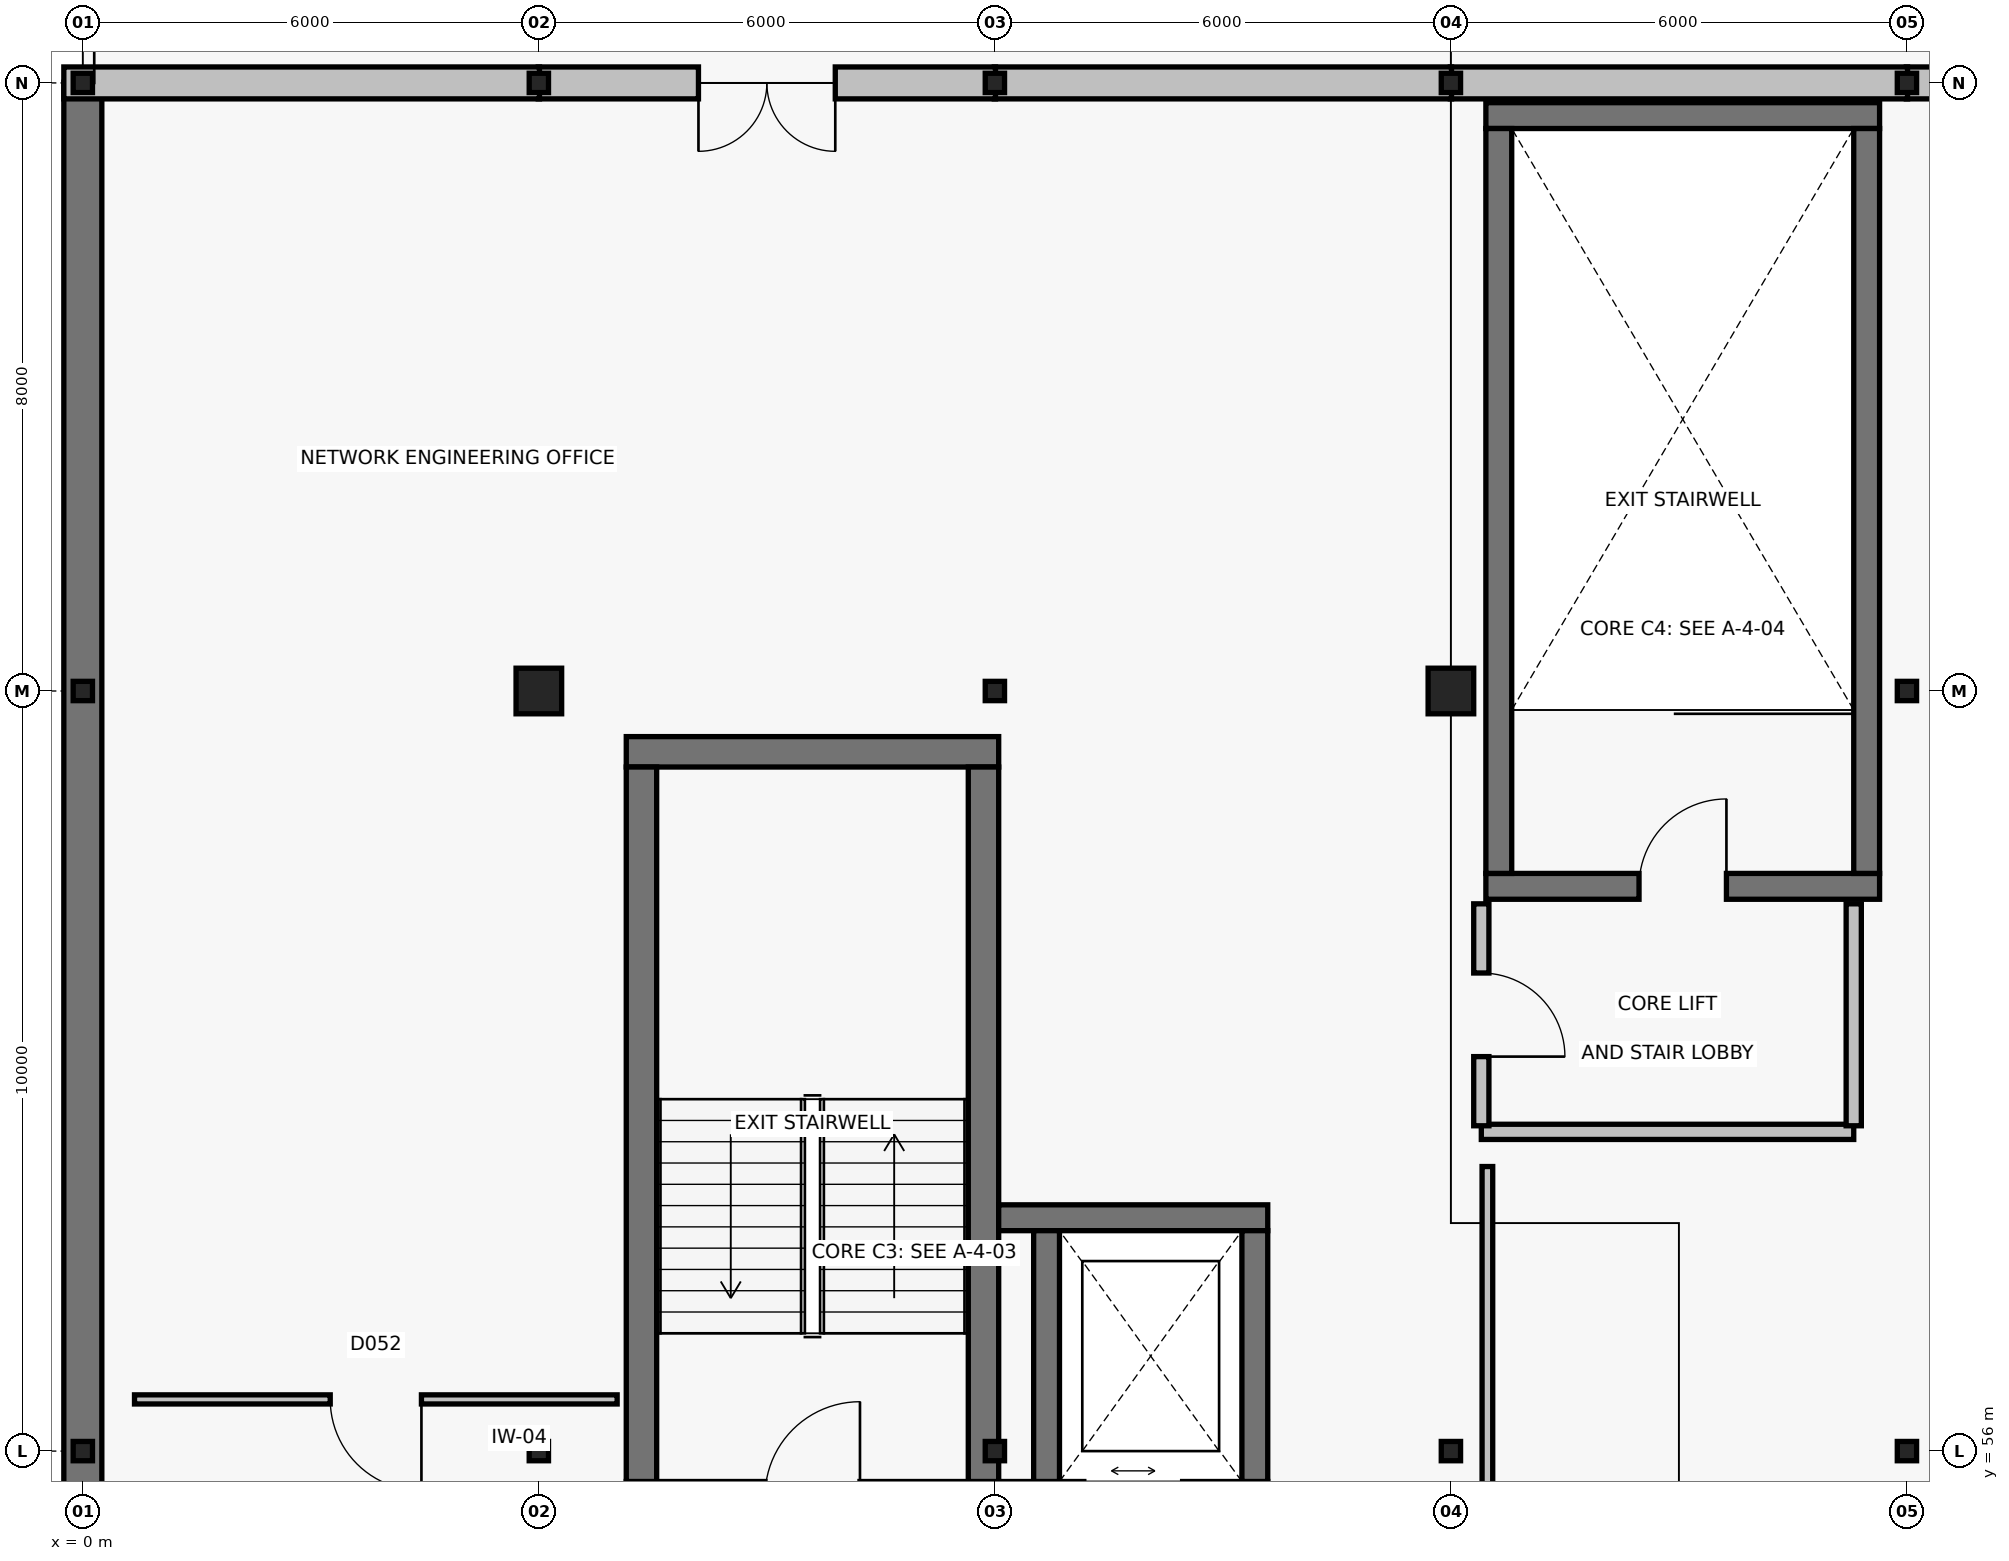
"""IFC4 building model, lengths in metres.
Left out: names, types, materials, properties, quantities, classifications, styles, units other than length and angle.
Written with IfcOpenShell. Run it as: python <this file> out.ifc"""

import sys

from ifc_helpers import new_model, si_unit, direction, frame, frame_2d, origin, origin_2d, place, context, subcontext, project, spatial, rectangle, hollow_rectangle, extrude, element, fill, save


model = new_model("IFC4")
c1 = context("Model", 3, precision=1e-05, world=origin(), true_north=direction((0.0, 1.0)))
c2 = subcontext(c1, "Body", "Model", "MODEL_VIEW")
j1 = project(units=[si_unit("LENGTHUNIT", "METRE"), si_unit("PLANEANGLEUNIT", "RADIAN")], contexts=[c1])
p1 = place(None, origin())
s1 = spatial("IfcSite", under=j1, at=p1, CompositionType="ELEMENT")
p2 = place(p1, origin())
s2 = spatial("IfcBuilding", under=s1, at=p2, CompositionType="ELEMENT")
p3 = place(p2, frame((0.0, 0.0, 15.4)))
s3 = spatial("IfcBuildingStorey", under=s2, at=p3, CompositionType="ELEMENT", Elevation=15.4)
for number, where, z_axis, x_axis in (
    (1, (0.0, 56.0, 0.0), (0.0, 0.0, 1.0), (1.0, 0.0, 0.0)),
    (2, (0.0, 66.0, 0.0), (0.0, 0.0, 1.0), (1.0, 0.0, 0.0)),
    (3, (0.0, 74.0, 0.0), (0.0, 0.0, 1.0), (1.0, 0.0, 0.0)),
    (4, (6.0, 56.0, 0.0), (0.0, 0.0, 1.0), (1.0, 0.0, 0.0)),
):
    element("IfcColumn", number, at=place(p3, frame(where, z_axis=z_axis, x_axis=x_axis)), inside=s3, PredefinedType="COLUMN", context=c2, shape_type="SweptSolid", body=[
        extrude(hollow_rectangle(XDim=0.254, YDim=0.254, WallThickness=0.01, InnerFilletRadius=0.01, OuterFilletRadius=0.019, at=origin_2d()), origin(), (0.0, 0.0, 1.0), 4.0),
    ])
p4 = place(p3, frame((6.0, 66.0, 0.0), z_axis=(0.0, 0.0, 1.0), x_axis=(1.0, 0.0, 0.0)))
e5 = element("IfcColumn", 5, at=p4, inside=s3, PredefinedType="COLUMN", context=c2, shape_type="SweptSolid", body=[
    extrude(rectangle(XDim=0.6, YDim=0.6, at=origin_2d()), origin(), (0.0, 0.0, 1.0), 4.0),
])
for number, where, z_axis, x_axis in (
    (6, (6.0, 74.0, 0.0), (0.0, 0.0, 1.0), (1.0, 0.0, 0.0)),
    (7, (12.0, 56.0, 0.0), (0.0, 0.0, 1.0), (1.0, 0.0, 0.0)),
    (8, (12.0, 66.0, 0.0), (0.0, 0.0, 1.0), (1.0, 0.0, 0.0)),
    (9, (12.0, 74.0, 0.0), (0.0, 0.0, 1.0), (1.0, 0.0, 0.0)),
    (10, (18.0, 56.0, 0.0), (0.0, 0.0, 1.0), (1.0, 0.0, 0.0)),
):
    element("IfcColumn", number, at=place(p3, frame(where, z_axis=z_axis, x_axis=x_axis)), inside=s3, PredefinedType="COLUMN", context=c2, shape_type="SweptSolid", body=[
        extrude(hollow_rectangle(XDim=0.254, YDim=0.254, WallThickness=0.01, InnerFilletRadius=0.01, OuterFilletRadius=0.019, at=origin_2d()), origin(), (0.0, 0.0, 1.0), 4.0),
    ])
p5 = place(p3, frame((18.0, 66.0, 0.0), z_axis=(0.0, 0.0, 1.0), x_axis=(1.0, 0.0, 0.0)))
e11 = element("IfcColumn", 11, at=p5, inside=s3, PredefinedType="COLUMN", context=c2, shape_type="SweptSolid", body=[
    extrude(rectangle(XDim=0.6, YDim=0.6, at=origin_2d()), origin(), (0.0, 0.0, 1.0), 4.0),
])
for number, where, z_axis, x_axis in (
    (12, (18.0, 74.0, 0.0), (0.0, 0.0, 1.0), (1.0, 0.0, 0.0)),
    (13, (24.0, 56.0, 0.0), (0.0, 0.0, 1.0), (1.0, 0.0, 0.0)),
    (14, (24.0, 66.0, 0.0), (0.0, 0.0, 1.0), (1.0, 0.0, 0.0)),
    (15, (24.0, 74.0, 0.0), (0.0, 0.0, 1.0), (1.0, 0.0, 0.0)),
):
    element("IfcColumn", number, at=place(p3, frame(where, z_axis=z_axis, x_axis=x_axis)), inside=s3, PredefinedType="COLUMN", context=c2, shape_type="SweptSolid", body=[
        extrude(hollow_rectangle(XDim=0.254, YDim=0.254, WallThickness=0.01, InnerFilletRadius=0.01, OuterFilletRadius=0.019, at=origin_2d()), origin(), (0.0, 0.0, 1.0), 4.0),
    ])
p6 = place(p3, frame((0.0, -0.008, 0.0), z_axis=(0.0, 0.0, 1.0), x_axis=(0.0, 1.0, 0.0)))
e16 = element("IfcWall", 16, at=p6, inside=s3, PredefinedType="SOLIDWALL", context=c2, shape_type="SweptSolid", body=[
    extrude(rectangle(XDim=74.016, YDim=0.5, at=frame_2d((37.008, 0.0))), origin(), (0.0, 0.0, 1.0), 3.68),
])
p7 = place(p3, frame((30.008, 74.0, 0.0), z_axis=(0.0, 0.0, 1.0), x_axis=(-1.0, 0.0, 0.0)))
e17 = element("IfcWall", 17, at=p7, inside=s3, PredefinedType="SOLIDWALL", context=c2, shape_type="SweptSolid", body=[
    extrude(rectangle(XDim=6.016, YDim=0.42, at=frame_2d((3.008, 0.0))), origin(), (0.0, 0.0, 1.0), 2.957),
])
p8 = place(p7, frame((2.033, 0.0, 0.0)))
e18 = element("IfcOpeningElement", 18, at=p8, cuts=e17, PredefinedType="OPENING", context=c2, shape_type="SweptSolid", body=[
    extrude(rectangle(XDim=1.95, YDim=2.3, at=frame_2d((0.975, 1.15))), frame((0.0, 0.225, 0.0), z_axis=(0.0, -1.0, 0.0), x_axis=(1.0, 0.0, 0.0)), (0.0, 0.0, 1.0), 0.45),
])
for number, where, z_axis, x_axis in (
    (19, (24.008, 74.0, 0.0), (0.0, 0.0, 1.0), (-1.0, 0.0, 0.0)),
    (20, (18.008, 74.0, 0.0), (0.0, 0.0, 1.0), (-1.0, 0.0, 0.0)),
):
    element("IfcWall", number, at=place(p3, frame(where, z_axis=z_axis, x_axis=x_axis)), inside=s3, PredefinedType="SOLIDWALL", context=c2, shape_type="SweptSolid", body=[
        extrude(rectangle(XDim=6.016, YDim=0.42, at=frame_2d((3.008, 0.0))), origin(), (0.0, 0.0, 1.0), 2.957),
    ])
p9 = place(p3, frame((12.008, 74.0, 0.0), z_axis=(0.0, 0.0, 1.0), x_axis=(-1.0, 0.0, 0.0)))
e21 = element("IfcWall", 21, at=p9, inside=s3, PredefinedType="SOLIDWALL", context=c2, shape_type="SweptSolid", body=[
    extrude(rectangle(XDim=6.016, YDim=0.42, at=frame_2d((3.008, 0.0))), origin(), (0.0, 0.0, 1.0), 2.957),
])
p10 = place(p9, frame((2.108, 0.0, 0.0)))
e22 = element("IfcOpeningElement", 22, at=p10, cuts=e21, PredefinedType="OPENING", context=c2, shape_type="SweptSolid", body=[
    extrude(rectangle(XDim=1.8, YDim=2.25, at=frame_2d((0.9, 1.125))), frame((0.0, 0.225, 0.0), z_axis=(0.0, -1.0, 0.0), x_axis=(1.0, 0.0, 0.0)), (0.0, 0.0, 1.0), 0.45),
])
p11 = place(p3, frame((6.008, 74.0, 0.0), z_axis=(0.0, 0.0, 1.0), x_axis=(-1.0, 0.0, 0.0)))
e23 = element("IfcWall", 23, at=p11, inside=s3, PredefinedType="SOLIDWALL", context=c2, shape_type="SweptSolid", body=[
    extrude(rectangle(XDim=6.258, YDim=0.42, at=frame_2d((3.129, 0.0))), origin(), (0.0, 0.0, 1.0), 2.957),
])
p12 = place(p3, frame((12.05, 65.2, 0.0), z_axis=(0.0, 0.0, 1.0), x_axis=(-1.0, 0.0, 0.0)))
e24 = element("IfcWall", 24, at=p12, inside=s3, PredefinedType="SHEAR", context=c2, shape_type="SweptSolid", body=[
    extrude(rectangle(XDim=4.9, YDim=0.4, at=frame_2d((2.45, 0.0))), origin(), (0.0, 0.0, 1.0), 3.7),
])
for number, where, z_axis, x_axis in (
    (25, (7.35, 65.0, 0.0), (0.0, 0.0, 1.0), (0.0, -1.0, 0.0)),
    (26, (11.85, 55.6, 0.0), (0.0, 0.0, 1.0), (0.0, 1.0, 0.0)),
):
    element("IfcWall", number, at=place(p3, frame(where, z_axis=z_axis, x_axis=x_axis)), inside=s3, PredefinedType="SHEAR", context=c2, shape_type="SweptSolid", body=[
        extrude(rectangle(XDim=9.4, YDim=0.4, at=frame_2d((4.7, 0.0))), origin(), (0.0, 0.0, 1.0), 3.7),
    ])
p13 = place(p3, frame((15.59, 59.07, 0.0), z_axis=(0.0, 0.0, 1.0), x_axis=(-1.0, 0.0, 0.0)))
e27 = element("IfcWall", 27, at=p13, inside=s3, PredefinedType="SHEAR", context=c2, shape_type="SweptSolid", body=[
    extrude(rectangle(XDim=3.54, YDim=0.34, at=frame_2d((1.77, 0.0))), origin(), (0.0, 0.0, 1.0), 3.7),
])
for number, where, z_axis, x_axis in (
    (28, (12.68, 58.9, 0.0), (0.0, 0.0, 1.0), (0.0, -1.0, 0.0)),
    (29, (15.42, 55.6, 0.0), (0.0, 0.0, 1.0), (0.0, 1.0, 0.0)),
):
    element("IfcWall", number, at=place(p3, frame(where, z_axis=z_axis, x_axis=x_axis)), inside=s3, PredefinedType="SHEAR", context=c2, shape_type="SweptSolid", body=[
        extrude(rectangle(XDim=3.3, YDim=0.34, at=frame_2d((1.65, 0.0))), origin(), (0.0, 0.0, 1.0), 3.7),
    ])
p14 = place(p3, frame((18.46, 63.43, 0.0), z_axis=(0.0, 0.0, 1.0), x_axis=(1.0, 0.0, 0.0)))
e30 = element("IfcWall", 30, at=p14, inside=s3, PredefinedType="SHEAR", context=c2, shape_type="SweptSolid", body=[
    extrude(rectangle(XDim=5.18, YDim=0.34, at=frame_2d((2.59, 0.0))), origin(), (0.0, 0.0, 1.0), 3.7),
])
p15 = place(p14, frame((2.015, 0.0, 0.0)))
e31 = element("IfcOpeningElement", 31, at=p15, cuts=e30, PredefinedType="OPENING", context=c2, shape_type="SweptSolid", body=[
    extrude(rectangle(XDim=1.15, YDim=2.15, at=frame_2d((0.575, 1.075))), frame((0.0, 0.185, 0.0), z_axis=(0.0, -1.0, 0.0), x_axis=(1.0, 0.0, 0.0)), (0.0, 0.0, 1.0), 0.37),
])
p16 = place(p3, frame((23.64, 73.57, 0.0), z_axis=(0.0, 0.0, 1.0), x_axis=(-1.0, 0.0, 0.0)))
e32 = element("IfcWall", 32, at=p16, inside=s3, PredefinedType="SHEAR", context=c2, shape_type="SweptSolid", body=[
    extrude(rectangle(XDim=5.18, YDim=0.34, at=frame_2d((2.59, 0.0))), origin(), (0.0, 0.0, 1.0), 3.7),
])
for number, where, z_axis, x_axis in (
    (33, (18.63, 73.4, 0.0), (0.0, 0.0, 1.0), (0.0, -1.0, 0.0)),
    (34, (23.47, 63.6, 0.0), (0.0, 0.0, 1.0), (0.0, 1.0, 0.0)),
):
    element("IfcWall", number, at=place(p3, frame(where, z_axis=z_axis, x_axis=x_axis)), inside=s3, PredefinedType="SHEAR", context=c2, shape_type="SweptSolid", body=[
        extrude(rectangle(XDim=9.8, YDim=0.34, at=frame_2d((4.9, 0.0))), origin(), (0.0, 0.0, 1.0), 3.7),
    ])
p17 = place(p3, frame((18.4, 60.2, 0.0), z_axis=(0.0, 0.0, 1.0), x_axis=(1.0, 0.0, 0.0)))
e35 = element("IfcWall", 35, at=p17, inside=s3, PredefinedType="PARTITIONING", context=c2, shape_type="SweptSolid", body=[
    extrude(rectangle(XDim=4.9, YDim=0.2, at=frame_2d((2.45, 0.0))), origin(), (0.0, 0.0, 1.0), 2.957),
])
p18 = place(p3, frame((18.4, 63.2, 0.0), z_axis=(0.0, 0.0, 1.0), x_axis=(0.0, -1.0, 0.0)))
e36 = element("IfcWall", 36, at=p18, inside=s3, PredefinedType="PARTITIONING", context=c2, shape_type="SweptSolid", body=[
    extrude(rectangle(XDim=2.92, YDim=0.2, at=frame_2d((1.46, 0.0))), origin(), (0.0, 0.0, 1.0), 2.957),
])
p19 = place(p18, frame((0.91, 0.0, 0.0)))
e37 = element("IfcOpeningElement", 37, at=p19, cuts=e36, PredefinedType="OPENING", context=c2, shape_type="SweptSolid", body=[
    extrude(rectangle(XDim=1.1, YDim=2.15, at=frame_2d((0.55, 1.075))), frame((0.0, 0.115, 0.0), z_axis=(0.0, -1.0, 0.0), x_axis=(1.0, 0.0, 0.0)), (0.0, 0.0, 1.0), 0.23),
])
p20 = place(p3, frame((23.3, 60.28, 0.0), z_axis=(0.0, 0.0, 1.0), x_axis=(0.0, 1.0, 0.0)))
e38 = element("IfcWall", 38, at=p20, inside=s3, PredefinedType="PARTITIONING", context=c2, shape_type="SweptSolid", body=[
    extrude(rectangle(XDim=2.92, YDim=0.2, at=frame_2d((1.46, 0.0))), origin(), (0.0, 0.0, 1.0), 3.68),
])
p21 = place(p3, frame((18.48, 34.68, 0.0), z_axis=(0.0, 0.0, 1.0), x_axis=(0.0, 1.0, 0.0)))
e39 = element("IfcWall", 39, at=p21, inside=s3, PredefinedType="PARTITIONING", context=c2, shape_type="SweptSolid", body=[
    extrude(rectangle(XDim=25.064, YDim=0.14, at=frame_2d((12.532, 0.0))), origin(), (0.0, 0.0, 1.0), 3.111),
])
p22 = place(p21, frame((15.551, 0.0, 0.0)))
e40 = element("IfcOpeningElement", 40, at=p22, cuts=e39, PredefinedType="OPENING", context=c2, shape_type="SweptSolid", body=[
    extrude(rectangle(XDim=1.14, YDim=2.15, at=frame_2d((0.57, 1.075))), frame((0.0, 0.085, 0.0), z_axis=(0.0, -1.0, 0.0), x_axis=(1.0, 0.0, 0.0)), (0.0, 0.0, 1.0), 0.17),
])
p23 = place(p3, frame((7.03, 56.68, 0.0), z_axis=(0.0, 0.0, 1.0), x_axis=(-1.0, 0.0, 0.0)))
e41 = element("IfcWall", 41, at=p23, inside=s3, PredefinedType="PARTITIONING", context=c2, shape_type="SweptSolid", body=[
    extrude(rectangle(XDim=6.35, YDim=0.12, at=frame_2d((3.175, 0.0))), origin(), (0.0, 0.0, 1.0), 2.957),
])
p24 = place(p23, frame((2.575, 0.0, 0.0)))
e42 = element("IfcOpeningElement", 42, at=p24, cuts=e41, PredefinedType="OPENING", context=c2, shape_type="SweptSolid", body=[
    extrude(rectangle(XDim=1.2, YDim=2.15, at=frame_2d((0.6, 1.075))), frame((0.0, 0.075, 0.0), z_axis=(0.0, -1.0, 0.0), x_axis=(1.0, 0.0, 0.0)), (0.0, 0.0, 1.0), 0.15),
])
p25 = place(p10, origin())
e43 = element("IfcDoor", 43, at=p25, inside=s3, OperationType="DOUBLE_DOOR_SINGLE_SWING", PredefinedType="DOOR", context=c2, shape_type="SweptSolid", body=[
    extrude(rectangle(XDim=1.8, YDim=2.25, at=frame_2d((0.9, 1.125))), frame((0.0, 0.025, 0.0), z_axis=(0.0, -1.0, 0.0), x_axis=(1.0, 0.0, 0.0)), (0.0, 0.0, 1.0), 0.05),
])
fill(e22, e43)
p26 = place(p15, origin())
e44 = element("IfcDoor", 44, at=p26, inside=s3, OperationType="SINGLE_SWING_RIGHT", PredefinedType="DOOR", context=c2, shape_type="SweptSolid", body=[
    extrude(rectangle(XDim=1.15, YDim=2.15, at=frame_2d((0.575, 1.075))), frame((0.0, 0.025, 0.0), z_axis=(0.0, -1.0, 0.0), x_axis=(1.0, 0.0, 0.0)), (0.0, 0.0, 1.0), 0.05),
])
fill(e31, e44)
p27 = place(p19, origin())
e45 = element("IfcDoor", 45, at=p27, inside=s3, OperationType="SINGLE_SWING_RIGHT", PredefinedType="DOOR", context=c2, shape_type="SweptSolid", body=[
    extrude(rectangle(XDim=1.1, YDim=2.15, at=frame_2d((0.55, 1.075))), frame((0.0, 0.025, 0.0), z_axis=(0.0, -1.0, 0.0), x_axis=(1.0, 0.0, 0.0)), (0.0, 0.0, 1.0), 0.05),
])
fill(e37, e45)
p28 = place(p24, origin())
e46 = element("IfcDoor", 46, at=p28, inside=s3, OperationType="SINGLE_SWING_LEFT", PredefinedType="DOOR", context=c2, shape_type="SweptSolid", body=[
    extrude(rectangle(XDim=1.2, YDim=2.15, at=frame_2d((0.6, 1.075))), frame((0.0, 0.025, 0.0), z_axis=(0.0, -1.0, 0.0), x_axis=(1.0, 0.0, 0.0)), (0.0, 0.0, 1.0), 0.05),
])
fill(e42, e46)
save(model, sys.argv[1])
